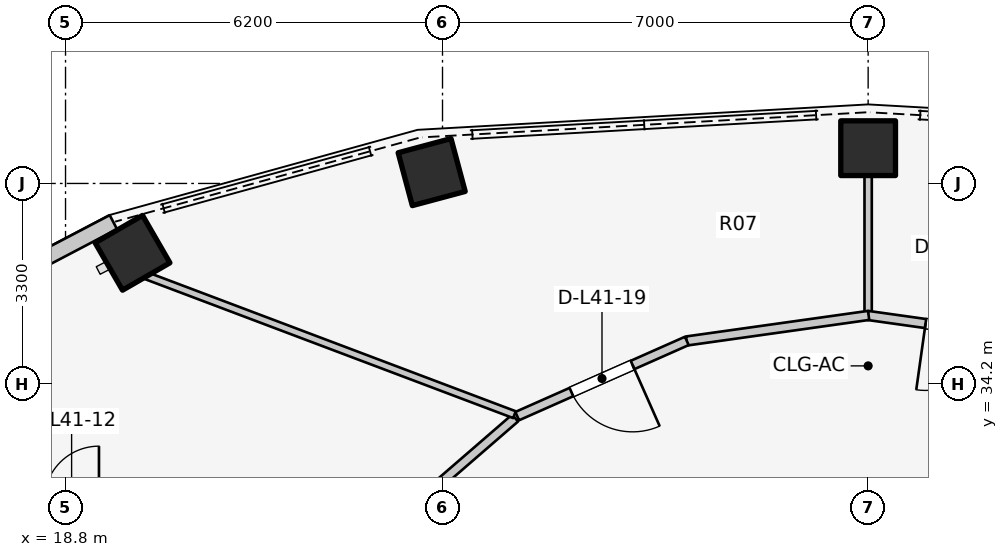
"""IFC4 building model, lengths in metres.
Left out: names, types, materials, properties, quantities, classifications, styles, units other than length and angle.
Written with IfcOpenShell. Run it as: python <this file> out.ifc"""

import sys

from ifc_helpers import new_model, si_unit, direction, frame, frame_2d, origin, origin_2d, place, context, subcontext, project, spatial, rectangle, extrude, element, fill, save


model = new_model("IFC4")
c1 = context("Model", 3, precision=1e-05, world=origin(), true_north=direction((0.0, 1.0)))
c2 = subcontext(c1, "Body", "Model", "MODEL_VIEW")
j1 = project(units=[si_unit("LENGTHUNIT", "METRE"), si_unit("PLANEANGLEUNIT", "RADIAN")], contexts=[c1])
p1 = place(None, origin())
s1 = spatial("IfcSite", under=j1, at=p1, CompositionType="ELEMENT")
p2 = place(p1, origin())
s2 = spatial("IfcBuilding", under=s1, at=p2, CompositionType="ELEMENT")
p3 = place(p2, frame((0.0, 0.0, 137.4)))
s3 = spatial("IfcBuildingStorey", under=s2, at=p3, CompositionType="ELEMENT", Elevation=137.4)
for number, where, z_axis, x_axis in (
    (1, (32.0, 38.08, 0.0), (0.0, 0.0, 1.0), (0.0, 1.0, 0.0)),
    (2, (24.822, 37.687, 0.0), (0.0, 0.0, 1.0), (-0.259, 0.966, 0.0)),
    (3, (19.902, 36.359, 0.0), (0.0, 0.0, 1.0), (-0.5, 0.866, 0.0)),
):
    element("IfcColumn", number, at=place(p3, frame(where, z_axis=z_axis, x_axis=x_axis)), inside=s3, PredefinedType="COLUMN", context=c2, shape_type="SweptSolid", body=[
        extrude(rectangle(XDim=0.9, YDim=0.9, at=origin_2d()), origin(), (0.0, 0.0, 1.0), 3.1),
    ])
p4 = place(p3, frame((19.587, 36.863, 0.0), z_axis=(0.0, 0.0, 1.0), x_axis=(-0.885660265226, -0.464333818065, 0.0)))
e4 = element("IfcWall", 4, at=p4, inside=s3, PredefinedType="STANDARD", context=c2, shape_type="SweptSolid", body=[
    extrude(rectangle(XDim=4.354, YDim=0.26, at=frame_2d((2.177, 0.0))), origin(), (0.0, 0.0, 1.0), 2.85),
])
p5 = place(p3, frame((26.193, 33.642, 0.0), z_axis=(0.0, 0.0, 1.0), x_axis=(-0.756055312247, -0.654507727092, 0.0)))
e5 = element("IfcWall", 5, at=p5, inside=s3, PredefinedType="PARTITIONING", context=c2, shape_type="SweptSolid", body=[
    extrude(rectangle(XDim=2.111, YDim=0.15, at=frame_2d((1.055, 0.0))), origin(), (0.0, 0.0, 1.0), 2.299),
])
p6 = place(p3, frame((32.0, 35.385, 0.0), z_axis=(0.0, 0.0, 1.0), x_axis=(0.0, 1.0, 0.0)))
e6 = element("IfcWall", 6, at=p6, inside=s3, PredefinedType="MOVABLE", context=c2, shape_type="SweptSolid", body=[
    extrude(rectangle(XDim=2.265, YDim=0.12, at=frame_2d((1.132, 0.0))), origin(), (0.0, 0.0, 1.0), 2.299),
])
p7 = place(p3, frame((26.184, 33.698, 0.0), z_axis=(0.0, 0.0, 1.0), x_axis=(-0.935601484289, 0.353057874288, 0.0)))
e7 = element("IfcWall", 7, at=p7, inside=s3, PredefinedType="MOVABLE", context=c2, shape_type="SweptSolid", body=[
    extrude(rectangle(XDim=6.484, YDim=0.12, at=frame_2d((3.242, 0.0))), origin(), (0.0, 0.0, 1.0), 2.299),
])
p8 = place(p3, frame((34.986, 34.909, 0.0), z_axis=(0.0, 0.0, 1.0), x_axis=(-0.990263536759, 0.139205343882, 0.0)))
e8 = element("IfcWall", 8, at=p8, inside=s3, PredefinedType="PARTITIONING", context=c2, shape_type="SweptSolid", body=[
    extrude(rectangle(XDim=3.024, YDim=0.15, at=frame_2d((1.512, 0.0))), origin(), (0.0, 0.0, 1.0), 2.299),
])
p9 = place(p8, frame((0.962, 0.0, 0.0)))
e9 = element("IfcOpeningElement", 9, at=p9, cuts=e8, PredefinedType="OPENING", context=c2, shape_type="SweptSolid", body=[
    extrude(rectangle(XDim=1.1, YDim=2.1, at=frame_2d((0.55, 1.05))), frame((0.0, 0.085, 0.0), z_axis=(0.0, -1.0, 0.0), x_axis=(1.0, 0.0, 0.0)), (0.0, 0.0, 1.0), 0.17),
])
p10 = place(p3, frame((32.008, 35.33, 0.0), z_axis=(0.0, 0.0, 1.0), x_axis=(-0.990263536759, -0.139205343882, 0.0)))
e10 = element("IfcWall", 10, at=p10, inside=s3, PredefinedType="PARTITIONING", context=c2, shape_type="SweptSolid", body=[
    extrude(rectangle(XDim=3.024, YDim=0.15, at=frame_2d((1.512, 0.0))), origin(), (0.0, 0.0, 1.0), 2.299),
])
p11 = place(p3, frame((29.018, 34.91, 0.0), z_axis=(0.0, 0.0, 1.0), x_axis=(-0.914216890927, -0.405225216815, 0.0)))
e11 = element("IfcWall", 11, at=p11, inside=s3, PredefinedType="PARTITIONING", context=c2, shape_type="SweptSolid", body=[
    extrude(rectangle(XDim=3.052, YDim=0.15, at=frame_2d((1.526, 0.0))), origin(), (0.0, 0.0, 1.0), 2.299),
])
p12 = place(p11, frame((0.976, 0.0, 0.0)))
e12 = element("IfcOpeningElement", 12, at=p12, cuts=e11, PredefinedType="OPENING", context=c2, shape_type="SweptSolid", body=[
    extrude(rectangle(XDim=1.1, YDim=2.1, at=frame_2d((0.55, 1.05))), frame((0.0, 0.085, 0.0), z_axis=(0.0, -1.0, 0.0), x_axis=(1.0, 0.0, 0.0)), (0.0, 0.0, 1.0), 0.17),
])
p13 = place(p9, origin())
e13 = element("IfcDoor", 13, at=p13, inside=s3, OperationType="SINGLE_SWING_RIGHT", PredefinedType="DOOR", context=c2, shape_type="SweptSolid", body=[
    extrude(rectangle(XDim=1.1, YDim=2.1, at=frame_2d((0.55, 1.05))), frame((0.0, 0.025, 0.0), z_axis=(0.0, -1.0, 0.0), x_axis=(1.0, 0.0, 0.0)), (0.0, 0.0, 1.0), 0.05),
])
fill(e9, e13)
p14 = place(p12, origin())
e14 = element("IfcDoor", 14, at=p14, inside=s3, OperationType="SINGLE_SWING_LEFT", PredefinedType="DOOR", context=c2, shape_type="SweptSolid", body=[
    extrude(rectangle(XDim=1.1, YDim=2.1, at=frame_2d((0.55, 1.05))), frame((0.0, 0.025, 0.0), z_axis=(0.0, -1.0, 0.0), x_axis=(1.0, 0.0, 0.0)), (0.0, 0.0, 1.0), 0.05),
])
fill(e12, e14)
save(model, sys.argv[1])
